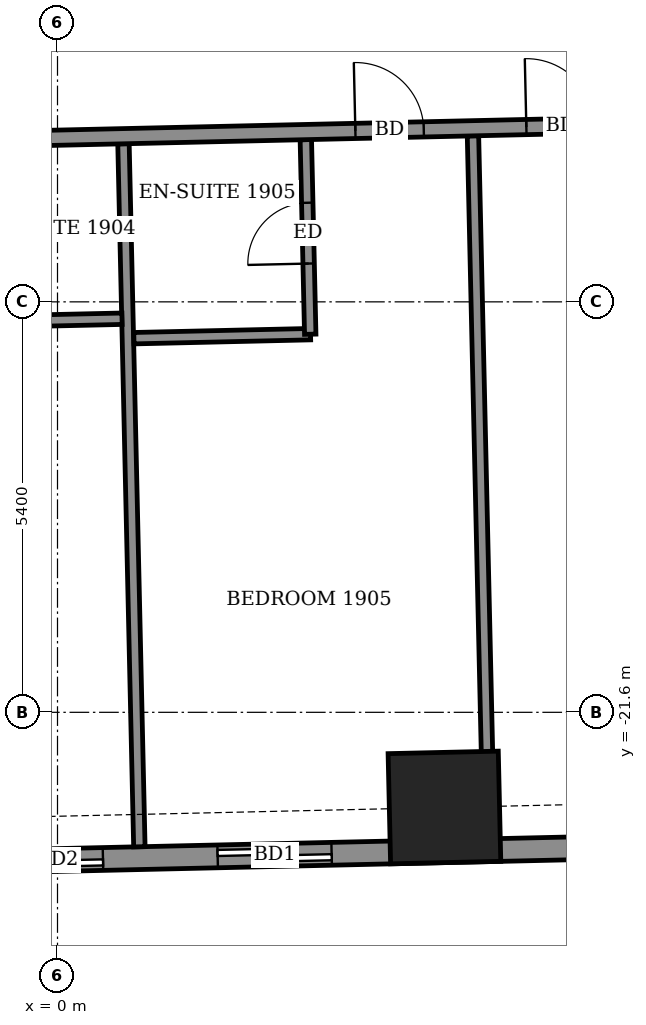
"""IFC4 building model, lengths in metres.
Left out: names, types, materials, properties, quantities, classifications, styles, units other than length and angle.
Written with IfcOpenShell. Run it as: python <this file> out.ifc"""

import sys

from ifc_helpers import new_model, si_unit, direction, frame, frame_2d, origin, origin_2d, place, context, subcontext, project, spatial, rectangle, extrude, element, fill, save


model = new_model("IFC4")
c1 = context("Model", 3, precision=1e-05, world=origin(), true_north=direction((0.0, 1.0)))
c2 = subcontext(c1, "Body", "Model", "MODEL_VIEW")
j1 = project(units=[si_unit("LENGTHUNIT", "METRE"), si_unit("PLANEANGLEUNIT", "RADIAN")], contexts=[c1])
p1 = place(None, origin())
s1 = spatial("IfcSite", under=j1, at=p1, CompositionType="ELEMENT")
p2 = place(p1, origin())
s2 = spatial("IfcBuilding", under=s1, at=p2, CompositionType="ELEMENT")
p3 = place(p2, frame((0.0, 0.0, 79.3)))
s3 = spatial("IfcBuildingStorey", under=s2, at=p3, CompositionType="ELEMENT", Elevation=79.3)
p4 = place(p3, frame((5.091, -22.852, -0.55), z_axis=(0.0, 0.0, 1.0), x_axis=(0.999743536241, 0.022646451015, 0.0)))
e1 = element("IfcColumn", 1, at=p4, inside=s3, PredefinedType="COLUMN", context=c2, shape_type="SweptSolid", body=[
    extrude(rectangle(XDim=1.45, YDim=1.45, at=origin_2d()), origin(), (0.0, 0.0, 1.0), 3.6),
])
p5 = place(p3, frame((-21.409, -24.029, 0.0), z_axis=(0.0, 0.0, 1.0), x_axis=(0.999742634032, 0.022686244721, 0.0)))
e2 = element("IfcWall", 2, at=p5, inside=s3, PredefinedType="SOLIDWALL", context=c2, shape_type="SweptSolid", body=[
    extrude(rectangle(XDim=46.372, YDim=0.3, at=frame_2d((23.186, 0.0))), origin(), (0.0, 0.0, 1.0), 3.05),
])
p6 = place(p5, frame((1.985, 0.0, 0.0)))
e3 = element("IfcOpeningElement", 3, at=p6, cuts=e2, PredefinedType="OPENING", context=c2, shape_type="SweptSolid", body=[
    extrude(rectangle(XDim=1.5, YDim=2.4, at=frame_2d((0.75, 1.2))), frame((0.0, 0.16, 0.0), z_axis=(0.0, -1.0, 0.0), x_axis=(1.0, 0.0, 0.0)), (0.0, 0.0, 1.0), 0.32),
])
p7 = place(p5, frame((7.371, 0.0, 0.0)))
e4 = element("IfcOpeningElement", 4, at=p7, cuts=e2, PredefinedType="OPENING", context=c2, shape_type="SweptSolid", body=[
    extrude(rectangle(XDim=1.2, YDim=2.4, at=frame_2d((0.6, 1.2))), frame((0.0, 0.16, 0.0), z_axis=(0.0, -1.0, 0.0), x_axis=(1.0, 0.0, 0.0)), (0.0, 0.0, 1.0), 0.32),
])
p8 = place(p5, frame((10.08, 0.0, 0.0)))
e5 = element("IfcOpeningElement", 5, at=p8, cuts=e2, PredefinedType="OPENING", context=c2, shape_type="SweptSolid", body=[
    extrude(rectangle(XDim=1.5, YDim=2.4, at=frame_2d((0.75, 1.2))), frame((0.0, 0.16, 0.0), z_axis=(0.0, -1.0, 0.0), x_axis=(1.0, 0.0, 0.0)), (0.0, 0.0, 1.0), 0.32),
])
p9 = place(p5, frame((15.08, 0.0, 0.0)))
e6 = element("IfcOpeningElement", 6, at=p9, cuts=e2, PredefinedType="OPENING", context=c2, shape_type="SweptSolid", body=[
    extrude(rectangle(XDim=1.5, YDim=2.4, at=frame_2d((0.75, 1.2))), frame((0.0, 0.16, 0.0), z_axis=(0.0, -1.0, 0.0), x_axis=(1.0, 0.0, 0.0)), (0.0, 0.0, 1.0), 0.32),
])
p10 = place(p5, frame((20.813, 0.0, 0.0)))
e7 = element("IfcOpeningElement", 7, at=p10, cuts=e2, PredefinedType="OPENING", context=c2, shape_type="SweptSolid", body=[
    extrude(rectangle(XDim=1.2, YDim=2.4, at=frame_2d((0.6, 1.2))), frame((0.0, 0.16, 0.0), z_axis=(0.0, -1.0, 0.0), x_axis=(1.0, 0.0, 0.0)), (0.0, 0.0, 1.0), 0.32),
])
p11 = place(p5, frame((23.522, 0.0, 0.0)))
e8 = element("IfcOpeningElement", 8, at=p11, cuts=e2, PredefinedType="OPENING", context=c2, shape_type="SweptSolid", body=[
    extrude(rectangle(XDim=1.5, YDim=2.4, at=frame_2d((0.75, 1.2))), frame((0.0, 0.16, 0.0), z_axis=(0.0, -1.0, 0.0), x_axis=(1.0, 0.0, 0.0)), (0.0, 0.0, 1.0), 0.32),
])
p12 = place(p5, frame((28.7, 0.0, 0.0)))
e9 = element("IfcOpeningElement", 9, at=p12, cuts=e2, PredefinedType="OPENING", context=c2, shape_type="SweptSolid", body=[
    extrude(rectangle(XDim=1.5, YDim=2.4, at=frame_2d((0.75, 1.2))), frame((0.0, 0.16, 0.0), z_axis=(0.0, -1.0, 0.0), x_axis=(1.0, 0.0, 0.0)), (0.0, 0.0, 1.0), 0.32),
])
p13 = place(p5, frame((34.206, 0.0, 0.0)))
e10 = element("IfcOpeningElement", 10, at=p13, cuts=e2, PredefinedType="OPENING", context=c2, shape_type="SweptSolid", body=[
    extrude(rectangle(XDim=1.5, YDim=2.4, at=frame_2d((0.75, 1.2))), frame((0.0, 0.16, 0.0), z_axis=(0.0, -1.0, 0.0), x_axis=(1.0, 0.0, 0.0)), (0.0, 0.0, 1.0), 0.32),
])
p14 = place(p5, frame((37.065, 0.0, 0.0)))
e11 = element("IfcOpeningElement", 11, at=p14, cuts=e2, PredefinedType="OPENING", context=c2, shape_type="SweptSolid", body=[
    extrude(rectangle(XDim=1.5, YDim=2.4, at=frame_2d((0.75, 1.2))), frame((0.0, 0.16, 0.0), z_axis=(0.0, -1.0, 0.0), x_axis=(1.0, 0.0, 0.0)), (0.0, 0.0, 1.0), 0.32),
])
p15 = place(p5, frame((41.698, 0.0, 0.9)))
e12 = element("IfcOpeningElement", 12, at=p15, cuts=e2, PredefinedType="OPENING", context=c2, shape_type="SweptSolid", body=[
    extrude(rectangle(XDim=2.4, YDim=1.5, at=frame_2d((1.2, 0.75))), frame((0.0, 0.16, 0.0), z_axis=(0.0, -1.0, 0.0), x_axis=(1.0, 0.0, 0.0)), (0.0, 0.0, 1.0), 0.32),
])
p16 = place(p3, frame((1.077, -23.369, 0.0), z_axis=(0.0, 0.0, 1.0), x_axis=(-0.022592505393, 0.999744756775, 0.0)))
e13 = element("IfcWall", 13, at=p16, inside=s3, PredefinedType="PARTITIONING", context=c2, shape_type="SweptSolid", body=[
    extrude(rectangle(XDim=9.25, YDim=0.15, at=frame_2d((4.625, 0.0))), origin(), (0.0, 0.0, 1.0), 2.55),
])
p17 = place(p3, frame((5.676, -23.264, 0.0), z_axis=(0.0, 0.0, 1.0), x_axis=(-0.022698023584, 0.999742366675, 0.0)))
e14 = element("IfcWall", 14, at=p17, inside=s3, PredefinedType="PARTITIONING", context=c2, shape_type="SweptSolid", body=[
    extrude(rectangle(XDim=9.25, YDim=0.15, at=frame_2d((4.625, 0.0))), origin(), (0.0, 0.0, 1.0), 3.05),
])
p18 = place(p3, frame((1.005, -16.678, 0.0), z_axis=(0.0, 0.0, 1.0), x_axis=(0.99974031529, 0.022788198363, 0.0)))
e15 = element("IfcWall", 15, at=p18, inside=s3, PredefinedType="PARTITIONING", context=c2, shape_type="SweptSolid", body=[
    extrude(rectangle(XDim=2.325, YDim=0.15, at=frame_2d((1.162, 0.0))), origin(), (0.0, 0.0, 1.0), 3.05),
])
p19 = place(p3, frame((3.325, -16.626, 0.0), z_axis=(0.0, 0.0, 1.0), x_axis=(-0.022595793415, 0.999744682466, 0.0)))
e16 = element("IfcWall", 16, at=p19, inside=s3, PredefinedType="PARTITIONING", context=c2, shape_type="SweptSolid", body=[
    extrude(rectangle(XDim=2.561, YDim=0.15, at=frame_2d((1.28, 0.0))), origin(), (0.0, 0.0, 1.0), 3.05),
])
p20 = place(p19, frame((0.93, 0.0, 0.0)))
e17 = element("IfcOpeningElement", 17, at=p20, cuts=e16, PredefinedType="OPENING", context=c2, shape_type="SweptSolid", body=[
    extrude(rectangle(XDim=0.8, YDim=2.1, at=frame_2d((0.4, 1.05))), frame((0.0, 0.085, 0.0), z_axis=(0.0, -1.0, 0.0), x_axis=(1.0, 0.0, 0.0)), (0.0, 0.0, 1.0), 0.17),
])
p21 = place(p3, frame((-1.476, -16.474, 0.0), z_axis=(0.0, 0.0, 1.0), x_axis=(0.999750007167, 0.022358961731, 0.0)))
e18 = element("IfcWall", 18, at=p21, inside=s3, PredefinedType="PARTITIONING", context=c2, shape_type="SweptSolid", body=[
    extrude(rectangle(XDim=2.326, YDim=0.15, at=frame_2d((1.163, 0.0))), origin(), (0.0, 0.0, 1.0), 3.05),
])
p22 = place(p3, frame((-24.249, -14.591, 0.0), z_axis=(0.0, 0.0, 1.0), x_axis=(0.999742227308, 0.022704161211, 0.0)))
e19 = element("IfcWall", 19, at=p22, inside=s3, PredefinedType="PARTITIONING", context=c2, shape_type="SweptSolid", body=[
    extrude(rectangle(XDim=52.421, YDim=0.2, at=frame_2d((26.211, 0.0))), origin(), (0.0, 0.0, 1.0), 3.05),
])
p23 = place(p22, frame((0.575, 0.0, 0.0)))
e20 = element("IfcOpeningElement", 20, at=p23, cuts=e19, PredefinedType="OPENING", context=c2, shape_type="SweptSolid", body=[
    extrude(rectangle(XDim=1.0, YDim=2.1, at=frame_2d((0.5, 1.05))), frame((0.0, 0.11, 0.0), z_axis=(0.0, -1.0, 0.0), x_axis=(1.0, 0.0, 0.0)), (0.0, 0.0, 1.0), 0.22),
])
p24 = place(p22, frame((5.225, 0.0, 0.0)))
e21 = element("IfcOpeningElement", 21, at=p24, cuts=e19, PredefinedType="OPENING", context=c2, shape_type="SweptSolid", body=[
    extrude(rectangle(XDim=0.9, YDim=2.1, at=frame_2d((0.45, 1.05))), frame((0.0, 0.11, 0.0), z_axis=(0.0, -1.0, 0.0), x_axis=(1.0, 0.0, 0.0)), (0.0, 0.0, 1.0), 0.22),
])
p25 = place(p22, frame((10.075, 0.0, 0.0)))
e22 = element("IfcOpeningElement", 22, at=p25, cuts=e19, PredefinedType="OPENING", context=c2, shape_type="SweptSolid", body=[
    extrude(rectangle(XDim=0.9, YDim=2.1, at=frame_2d((0.45, 1.05))), frame((0.0, 0.11, 0.0), z_axis=(0.0, -1.0, 0.0), x_axis=(1.0, 0.0, 0.0)), (0.0, 0.0, 1.0), 0.22),
])
p26 = place(p22, frame((12.1, 0.0, 0.0)))
e23 = element("IfcOpeningElement", 23, at=p26, cuts=e19, PredefinedType="OPENING", context=c2, shape_type="SweptSolid", body=[
    extrude(rectangle(XDim=0.9, YDim=2.1, at=frame_2d((0.45, 1.05))), frame((0.0, 0.11, 0.0), z_axis=(0.0, -1.0, 0.0), x_axis=(1.0, 0.0, 0.0)), (0.0, 0.0, 1.0), 0.22),
])
p27 = place(p22, frame((19.025, 0.0, 0.0)))
e24 = element("IfcOpeningElement", 24, at=p27, cuts=e19, PredefinedType="OPENING", context=c2, shape_type="SweptSolid", body=[
    extrude(rectangle(XDim=0.9, YDim=2.1, at=frame_2d((0.45, 1.05))), frame((0.0, 0.11, 0.0), z_axis=(0.0, -1.0, 0.0), x_axis=(1.0, 0.0, 0.0)), (0.0, 0.0, 1.0), 0.22),
])
p28 = place(p22, frame((21.225, 0.0, 0.0)))
e25 = element("IfcOpeningElement", 25, at=p28, cuts=e19, PredefinedType="OPENING", context=c2, shape_type="SweptSolid", body=[
    extrude(rectangle(XDim=0.9, YDim=2.1, at=frame_2d((0.45, 1.05))), frame((0.0, 0.11, 0.0), z_axis=(0.0, -1.0, 0.0), x_axis=(1.0, 0.0, 0.0)), (0.0, 0.0, 1.0), 0.22),
])
p29 = place(p22, frame((28.175, 0.0, 0.0)))
e26 = element("IfcOpeningElement", 26, at=p29, cuts=e19, PredefinedType="OPENING", context=c2, shape_type="SweptSolid", body=[
    extrude(rectangle(XDim=0.9, YDim=2.1, at=frame_2d((0.45, 1.05))), frame((0.0, 0.11, 0.0), z_axis=(0.0, -1.0, 0.0), x_axis=(1.0, 0.0, 0.0)), (0.0, 0.0, 1.0), 0.22),
])
p30 = place(p22, frame((30.425, 0.0, 0.0)))
e27 = element("IfcOpeningElement", 27, at=p30, cuts=e19, PredefinedType="OPENING", context=c2, shape_type="SweptSolid", body=[
    extrude(rectangle(XDim=0.9, YDim=2.1, at=frame_2d((0.45, 1.05))), frame((0.0, 0.11, 0.0), z_axis=(0.0, -1.0, 0.0), x_axis=(1.0, 0.0, 0.0)), (0.0, 0.0, 1.0), 0.22),
])
p31 = place(p22, frame((37.4, 0.0, 0.0)))
e28 = element("IfcOpeningElement", 28, at=p31, cuts=e19, PredefinedType="OPENING", context=c2, shape_type="SweptSolid", body=[
    extrude(rectangle(XDim=0.9, YDim=2.1, at=frame_2d((0.45, 1.05))), frame((0.0, 0.11, 0.0), z_axis=(0.0, -1.0, 0.0), x_axis=(1.0, 0.0, 0.0)), (0.0, 0.0, 1.0), 0.22),
])
p32 = place(p22, frame((39.375, 0.0, 0.0)))
e29 = element("IfcOpeningElement", 29, at=p32, cuts=e19, PredefinedType="OPENING", context=c2, shape_type="SweptSolid", body=[
    extrude(rectangle(XDim=0.9, YDim=2.1, at=frame_2d((0.45, 1.05))), frame((0.0, 0.11, 0.0), z_axis=(0.0, -1.0, 0.0), x_axis=(1.0, 0.0, 0.0)), (0.0, 0.0, 1.0), 0.22),
])
p33 = place(p22, frame((49.661, 0.0, 0.0)))
e30 = element("IfcOpeningElement", 30, at=p33, cuts=e19, PredefinedType="OPENING", context=c2, shape_type="SweptSolid", body=[
    extrude(rectangle(XDim=1.0, YDim=2.1, at=frame_2d((0.5, 1.05))), frame((0.0, 0.11, 0.0), z_axis=(0.0, -1.0, 0.0), x_axis=(1.0, 0.0, 0.0)), (0.0, 0.0, 1.0), 0.22),
])
p34 = place(p22, frame((44.025, 0.0, 0.0)))
e31 = element("IfcOpeningElement", 31, at=p34, cuts=e19, PredefinedType="OPENING", context=c2, shape_type="SweptSolid", body=[
    extrude(rectangle(XDim=0.9, YDim=2.1, at=frame_2d((0.45, 1.05))), frame((0.0, 0.11, 0.0), z_axis=(0.0, -1.0, 0.0), x_axis=(1.0, 0.0, 0.0)), (0.0, 0.0, 1.0), 0.22),
])
p35 = place(p10, origin())
e32 = element("IfcDoor", 32, at=p35, inside=s3, OperationType="SLIDING_TO_LEFT", PredefinedType="DOOR", context=c2, shape_type="SweptSolid", body=[
    extrude(rectangle(XDim=1.2, YDim=2.4, at=frame_2d((0.6, 1.2))), frame((0.0, 0.025, 0.0), z_axis=(0.0, -1.0, 0.0), x_axis=(1.0, 0.0, 0.0)), (0.0, 0.0, 1.0), 0.05),
])
fill(e7, e32)
p36 = place(p11, origin())
e33 = element("IfcDoor", 33, at=p36, inside=s3, OperationType="SLIDING_TO_LEFT", PredefinedType="DOOR", context=c2, shape_type="SweptSolid", body=[
    extrude(rectangle(XDim=1.5, YDim=2.4, at=frame_2d((0.75, 1.2))), frame((0.0, 0.025, 0.0), z_axis=(0.0, -1.0, 0.0), x_axis=(1.0, 0.0, 0.0)), (0.0, 0.0, 1.0), 0.05),
])
fill(e8, e33)
p37 = place(p29, origin())
e34 = element("IfcDoor", 34, at=p37, inside=s3, OperationType="SINGLE_SWING_LEFT", PredefinedType="DOOR", context=c2, shape_type="SweptSolid", body=[
    extrude(rectangle(XDim=0.9, YDim=2.1, at=frame_2d((0.45, 1.05))), frame((0.0, 0.025, 0.0), z_axis=(0.0, -1.0, 0.0), x_axis=(1.0, 0.0, 0.0)), (0.0, 0.0, 1.0), 0.05),
])
fill(e26, e34)
p38 = place(p20, origin())
e35 = element("IfcDoor", 35, at=p38, inside=s3, OperationType="SINGLE_SWING_LEFT", PredefinedType="DOOR", context=c2, shape_type="SweptSolid", body=[
    extrude(rectangle(XDim=0.8, YDim=2.1, at=frame_2d((0.4, 1.05))), frame((0.0, 0.025, 0.0), z_axis=(0.0, -1.0, 0.0), x_axis=(1.0, 0.0, 0.0)), (0.0, 0.0, 1.0), 0.05),
])
fill(e17, e35)
p39 = place(p30, origin())
e36 = element("IfcDoor", 36, at=p39, inside=s3, OperationType="SINGLE_SWING_RIGHT", PredefinedType="DOOR", context=c2, shape_type="SweptSolid", body=[
    extrude(rectangle(XDim=0.9, YDim=2.1, at=frame_2d((0.45, 1.05))), frame((0.0, 0.025, 0.0), z_axis=(0.0, -1.0, 0.0), x_axis=(1.0, 0.0, 0.0)), (0.0, 0.0, 1.0), 0.05),
])
fill(e27, e36)
save(model, sys.argv[1])
